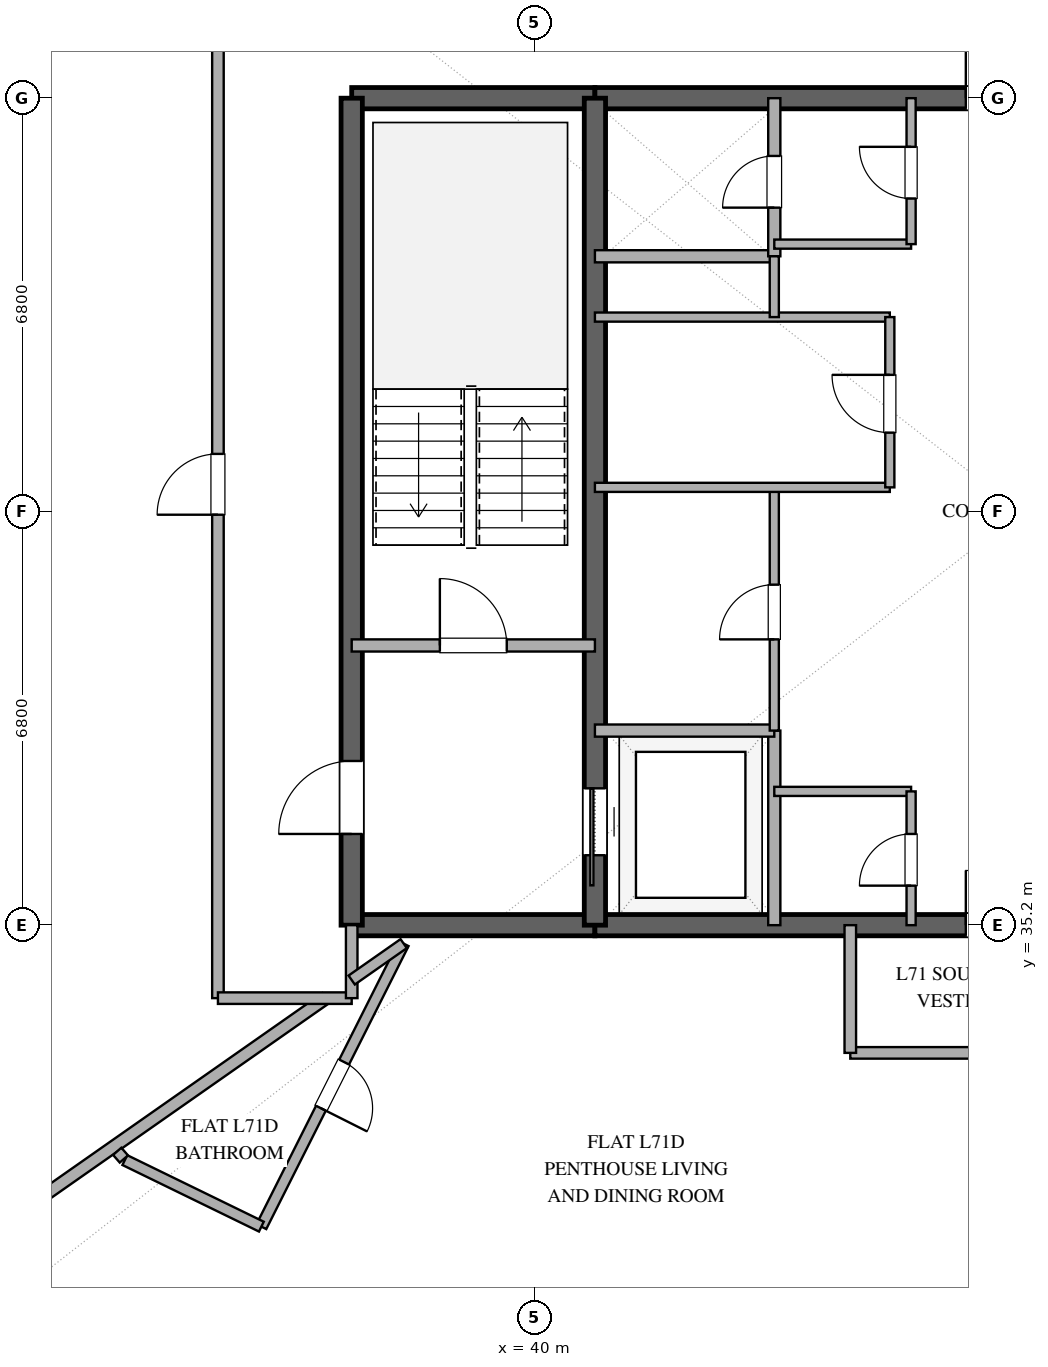
"""IFC4 building model, lengths in metres.
Left out: names, types, materials, properties, quantities, classifications, styles, units other than length and angle.
Written with IfcOpenShell. Run it as: python <this file> out.ifc"""

import sys

from ifc_helpers import new_model, si_unit, direction, frame, frame_2d, origin, place, context, subcontext, project, spatial, rectangle, extrude, element, fill, save


model = new_model("IFC4")
c1 = context("Model", 3, precision=1e-05, world=origin(), true_north=direction((0.0, 1.0)))
c2 = subcontext(c1, "Body", "Model", "MODEL_VIEW")
j1 = project(units=[si_unit("LENGTHUNIT", "METRE"), si_unit("PLANEANGLEUNIT", "RADIAN")], contexts=[c1])
p1 = place(None, origin())
s1 = spatial("IfcSite", under=j1, at=p1, CompositionType="ELEMENT")
p2 = place(p1, origin())
s2 = spatial("IfcBuilding", under=s1, at=p2, CompositionType="ELEMENT")
p3 = place(p2, frame((0.0, 0.0, 276.6)))
s3 = spatial("IfcBuildingStorey", under=s2, at=p3, CompositionType="ELEMENT", Elevation=276.6)
p4 = place(p3, frame((37.0, 35.2, 0.0), z_axis=(0.0, 0.0, 1.0), x_axis=(1.0, 0.0, 0.0)))
e1 = element("IfcWall", 1, at=p4, inside=s3, PredefinedType="SHEAR", context=c2, shape_type="SweptSolid", body=[
    extrude(rectangle(XDim=4.0, YDim=0.35, at=frame_2d((2.0, 0.0))), origin(), (0.0, 0.0, 1.0), 3.37),
])
p5 = place(p3, frame((41.0, 35.2, 0.0), z_axis=(0.0, 0.0, 1.0), x_axis=(1.0, 0.0, 0.0)))
e2 = element("IfcWall", 2, at=p5, inside=s3, PredefinedType="SHEAR", context=c2, shape_type="SweptSolid", body=[
    extrude(rectangle(XDim=14.0, YDim=0.35, at=frame_2d((7.0, 0.0))), origin(), (0.0, 0.0, 1.0), 3.37),
])
p6 = place(p5, frame((6.1, 0.0, 0.0)))
e3 = element("IfcOpeningElement", 3, at=p6, cuts=e2, PredefinedType="OPENING", context=c2, shape_type="SweptSolid", body=[
    extrude(rectangle(XDim=1.8, YDim=2.25, at=frame_2d((0.9, 1.125))), frame((0.0, 0.185, 0.0), z_axis=(0.0, -1.0, 0.0), x_axis=(1.0, 0.0, 0.0)), (0.0, 0.0, 1.0), 0.37),
])
p7 = place(p3, frame((37.0, 48.8, 0.0), z_axis=(0.0, 0.0, 1.0), x_axis=(1.0, 0.0, 0.0)))
e4 = element("IfcWall", 4, at=p7, inside=s3, PredefinedType="SHEAR", context=c2, shape_type="SweptSolid", body=[
    extrude(rectangle(XDim=4.0, YDim=0.35, at=frame_2d((2.0, 0.0))), origin(), (0.0, 0.0, 1.0), 3.37),
])
p8 = place(p3, frame((41.0, 48.8, 0.0), z_axis=(0.0, 0.0, 1.0), x_axis=(1.0, 0.0, 0.0)))
e5 = element("IfcWall", 5, at=p8, inside=s3, PredefinedType="SHEAR", context=c2, shape_type="SweptSolid", body=[
    extrude(rectangle(XDim=14.0, YDim=0.35, at=frame_2d((7.0, 0.0))), origin(), (0.0, 0.0, 1.0), 3.37),
])
p9 = place(p8, frame((6.1, 0.0, 0.0)))
e6 = element("IfcOpeningElement", 6, at=p9, cuts=e5, PredefinedType="OPENING", context=c2, shape_type="SweptSolid", body=[
    extrude(rectangle(XDim=1.8, YDim=2.25, at=frame_2d((0.9, 1.125))), frame((0.0, 0.185, 0.0), z_axis=(0.0, -1.0, 0.0), x_axis=(1.0, 0.0, 0.0)), (0.0, 0.0, 1.0), 0.37),
])
p10 = place(p3, frame((37.0, 35.2, 0.0), z_axis=(0.0, 0.0, 1.0), x_axis=(0.0, 1.0, 0.0)))
e7 = element("IfcWall", 7, at=p10, inside=s3, PredefinedType="SHEAR", context=c2, shape_type="SweptSolid", body=[
    extrude(rectangle(XDim=13.6, YDim=0.35, at=frame_2d((6.8, 0.0))), origin(), (0.0, 0.0, 1.0), 3.37),
])
p11 = place(p10, frame((1.5, 0.0, 0.0)))
e8 = element("IfcOpeningElement", 8, at=p11, cuts=e7, PredefinedType="OPENING", context=c2, shape_type="SweptSolid", body=[
    extrude(rectangle(XDim=1.2, YDim=2.15, at=frame_2d((0.6, 1.075))), frame((0.0, 0.185, 0.0), z_axis=(0.0, -1.0, 0.0), x_axis=(1.0, 0.0, 0.0)), (0.0, 0.0, 1.0), 0.37),
])
p12 = place(p3, frame((41.0, 35.2, 0.0), z_axis=(0.0, 0.0, 1.0), x_axis=(0.0, 1.0, 0.0)))
e9 = element("IfcWall", 9, at=p12, inside=s3, PredefinedType="SHEAR", context=c2, shape_type="SweptSolid", body=[
    extrude(rectangle(XDim=13.6, YDim=0.35, at=frame_2d((6.8, 0.0))), origin(), (0.0, 0.0, 1.0), 3.37),
])
p13 = place(p12, frame((1.15, 0.0, 0.0)))
e10 = element("IfcOpeningElement", 10, at=p13, cuts=e9, PredefinedType="OPENING", context=c2, shape_type="SweptSolid", body=[
    extrude(rectangle(XDim=1.1, YDim=2.2, at=frame_2d((0.55, 1.1))), frame((0.0, 0.185, 0.0), z_axis=(0.0, -1.0, 0.0), x_axis=(1.0, 0.0, 0.0)), (0.0, 0.0, 1.0), 0.37),
])
p14 = place(p3, frame((37.0, 39.8, 0.0), z_axis=(0.0, 0.0, 1.0), x_axis=(1.0, 0.0, 0.0)))
e11 = element("IfcWall", 11, at=p14, inside=s3, PredefinedType="SOLIDWALL", context=c2, shape_type="SweptSolid", body=[
    extrude(rectangle(XDim=4.0, YDim=0.2, at=frame_2d((2.0, 0.0))), origin(), (0.0, 0.0, 1.0), 2.73),
])
p15 = place(p14, frame((1.45, 0.0, 0.0)))
e12 = element("IfcOpeningElement", 12, at=p15, cuts=e11, PredefinedType="OPENING", context=c2, shape_type="SweptSolid", body=[
    extrude(rectangle(XDim=1.1, YDim=2.15, at=frame_2d((0.55, 1.075))), frame((0.0, 0.11, 0.0), z_axis=(0.0, -1.0, 0.0), x_axis=(1.0, 0.0, 0.0)), (0.0, 0.0, 1.0), 0.22),
])
p16 = place(p3, frame((43.95, 35.2, 0.0), z_axis=(0.0, 0.0, 1.0), x_axis=(0.0, 1.0, 0.0)))
e13 = element("IfcWall", 13, at=p16, inside=s3, PredefinedType="SOLIDWALL", context=c2, shape_type="SweptSolid", body=[
    extrude(rectangle(XDim=3.2, YDim=0.2, at=frame_2d((1.6, 0.0))), origin(), (0.0, 0.0, 1.0), 2.73),
])
for number, where, z_axis, x_axis in (
    (14, (41.0, 38.4, 0.0), (0.0, 0.0, 1.0), (1.0, 0.0, 0.0)),
    (15, (41.0, 46.2, 0.0), (0.0, 0.0, 1.0), (1.0, 0.0, 0.0)),
):
    element("IfcWall", number, at=place(p3, frame(where, z_axis=z_axis, x_axis=x_axis)), inside=s3, PredefinedType="SOLIDWALL", context=c2, shape_type="SweptSolid", body=[
        extrude(rectangle(XDim=2.95, YDim=0.2, at=frame_2d((1.475, 0.0))), origin(), (0.0, 0.0, 1.0), 2.73),
    ])
p17 = place(p3, frame((43.95, 46.2, 0.0), z_axis=(0.0, 0.0, 1.0), x_axis=(0.0, 1.0, 0.0)))
e16 = element("IfcWall", 16, at=p17, inside=s3, PredefinedType="SOLIDWALL", context=c2, shape_type="SweptSolid", body=[
    extrude(rectangle(XDim=2.6, YDim=0.2, at=frame_2d((1.3, 0.0))), origin(), (0.0, 0.0, 1.0), 2.73),
])
p18 = place(p17, frame((0.8, 0.0, 0.0)))
e17 = element("IfcOpeningElement", 17, at=p18, cuts=e16, PredefinedType="OPENING", context=c2, shape_type="SweptSolid", body=[
    extrude(rectangle(XDim=0.85, YDim=2.15, at=frame_2d((0.425, 1.075))), frame((0.0, 0.11, 0.0), z_axis=(0.0, -1.0, 0.0), x_axis=(1.0, 0.0, 0.0)), (0.0, 0.0, 1.0), 0.22),
])
p19 = place(p3, frame((43.95, 38.4, 0.0), z_axis=(0.0, 0.0, 1.0), x_axis=(0.0, 1.0, 0.0)))
e18 = element("IfcWall", 18, at=p19, inside=s3, PredefinedType="PARTITIONING", context=c2, shape_type="SweptSolid", body=[
    extrude(rectangle(XDim=4.0, YDim=0.15, at=frame_2d((2.0, 0.0))), origin(), (0.0, 0.0, 1.0), 2.73),
])
p20 = place(p19, frame((1.5, 0.0, 0.0)))
e19 = element("IfcOpeningElement", 19, at=p20, cuts=e18, PredefinedType="OPENING", context=c2, shape_type="SweptSolid", body=[
    extrude(rectangle(XDim=0.9, YDim=2.15, at=frame_2d((0.45, 1.075))), frame((0.0, 0.085, 0.0), z_axis=(0.0, -1.0, 0.0), x_axis=(1.0, 0.0, 0.0)), (0.0, 0.0, 1.0), 0.17),
])
for number, where, z_axis, x_axis in (
    (20, (41.0, 42.4, 0.0), (0.0, 0.0, 1.0), (1.0, 0.0, 0.0)),
    (21, (41.0, 45.2, 0.0), (0.0, 0.0, 1.0), (1.0, 0.0, 0.0)),
):
    element("IfcWall", number, at=place(p3, frame(where, z_axis=z_axis, x_axis=x_axis)), inside=s3, PredefinedType="PARTITIONING", context=c2, shape_type="SweptSolid", body=[
        extrude(rectangle(XDim=4.85, YDim=0.15, at=frame_2d((2.425, 0.0))), origin(), (0.0, 0.0, 1.0), 2.73),
    ])
p21 = place(p3, frame((43.95, 45.2, 0.0), z_axis=(0.0, 0.0, 1.0), x_axis=(0.0, 1.0, 0.0)))
e22 = element("IfcWall", 22, at=p21, inside=s3, PredefinedType="PARTITIONING", context=c2, shape_type="SweptSolid", body=[
    extrude(rectangle(XDim=1.0, YDim=0.15, at=frame_2d((0.5, 0.0))), origin(), (0.0, 0.0, 1.0), 2.73),
])
p22 = place(p3, frame((45.85, 42.4, 0.0), z_axis=(0.0, 0.0, 1.0), x_axis=(0.0, 1.0, 0.0)))
e23 = element("IfcWall", 23, at=p22, inside=s3, PredefinedType="PARTITIONING", context=c2, shape_type="SweptSolid", body=[
    extrude(rectangle(XDim=2.8, YDim=0.15, at=frame_2d((1.4, 0.0))), origin(), (0.0, 0.0, 1.0), 2.73),
])
p23 = place(p22, frame((0.9, 0.0, 0.0)))
e24 = element("IfcOpeningElement", 24, at=p23, cuts=e23, PredefinedType="OPENING", context=c2, shape_type="SweptSolid", body=[
    extrude(rectangle(XDim=0.95, YDim=2.15, at=frame_2d((0.475, 1.075))), frame((0.0, 0.085, 0.0), z_axis=(0.0, -1.0, 0.0), x_axis=(1.0, 0.0, 0.0)), (0.0, 0.0, 1.0), 0.17),
])
p24 = place(p3, frame((43.95, 37.4, 0.0), z_axis=(0.0, 0.0, 1.0), x_axis=(1.0, 0.0, 0.0)))
e25 = element("IfcWall", 25, at=p24, inside=s3, PredefinedType="PARTITIONING", context=c2, shape_type="SweptSolid", body=[
    extrude(rectangle(XDim=2.25, YDim=0.15, at=frame_2d((1.125, 0.0))), origin(), (0.0, 0.0, 1.0), 2.73),
])
p25 = place(p3, frame((46.2, 35.2, 0.0), z_axis=(0.0, 0.0, 1.0), x_axis=(0.0, 1.0, 0.0)))
e26 = element("IfcWall", 26, at=p25, inside=s3, PredefinedType="PARTITIONING", context=c2, shape_type="SweptSolid", body=[
    extrude(rectangle(XDim=2.2, YDim=0.15, at=frame_2d((1.1, 0.0))), origin(), (0.0, 0.0, 1.0), 2.73),
])
p26 = place(p25, frame((0.65, 0.0, 0.0)))
e27 = element("IfcOpeningElement", 27, at=p26, cuts=e26, PredefinedType="OPENING", context=c2, shape_type="SweptSolid", body=[
    extrude(rectangle(XDim=0.85, YDim=2.15, at=frame_2d((0.425, 1.075))), frame((0.0, 0.085, 0.0), z_axis=(0.0, -1.0, 0.0), x_axis=(1.0, 0.0, 0.0)), (0.0, 0.0, 1.0), 0.17),
])
p27 = place(p3, frame((43.95, 46.4, 0.0), z_axis=(0.0, 0.0, 1.0), x_axis=(1.0, 0.0, 0.0)))
e28 = element("IfcWall", 28, at=p27, inside=s3, PredefinedType="PARTITIONING", context=c2, shape_type="SweptSolid", body=[
    extrude(rectangle(XDim=2.25, YDim=0.15, at=frame_2d((1.125, 0.0))), origin(), (0.0, 0.0, 1.0), 2.73),
])
p28 = place(p3, frame((46.2, 46.4, 0.0), z_axis=(0.0, 0.0, 1.0), x_axis=(0.0, 1.0, 0.0)))
e29 = element("IfcWall", 29, at=p28, inside=s3, PredefinedType="PARTITIONING", context=c2, shape_type="SweptSolid", body=[
    extrude(rectangle(XDim=2.4, YDim=0.15, at=frame_2d((1.2, 0.0))), origin(), (0.0, 0.0, 1.0), 2.73),
])
p29 = place(p28, frame((0.75, 0.0, 0.0)))
e30 = element("IfcOpeningElement", 30, at=p29, cuts=e29, PredefinedType="OPENING", context=c2, shape_type="SweptSolid", body=[
    extrude(rectangle(XDim=0.85, YDim=2.15, at=frame_2d((0.425, 1.075))), frame((0.0, 0.085, 0.0), z_axis=(0.0, -1.0, 0.0), x_axis=(1.0, 0.0, 0.0)), (0.0, 0.0, 1.0), 0.17),
])
p30 = place(p3, frame((34.8, 34.0, 0.0), z_axis=(0.0, 0.0, 1.0), x_axis=(0.0, 1.0, 0.0)))
e31 = element("IfcWall", 31, at=p30, inside=s3, PredefinedType="PARTITIONING", context=c2, shape_type="SweptSolid", body=[
    extrude(rectangle(XDim=16.9, YDim=0.19, at=frame_2d((8.45, 0.0))), origin(), (0.0, 0.0, 1.0), 2.73),
])
p31 = place(p30, frame((7.95, 0.0, 0.0)))
e32 = element("IfcOpeningElement", 32, at=p31, cuts=e31, PredefinedType="OPENING", context=c2, shape_type="SweptSolid", body=[
    extrude(rectangle(XDim=1.0, YDim=2.2, at=frame_2d((0.5, 1.1))), frame((0.0, 0.105, 0.0), z_axis=(0.0, -1.0, 0.0), x_axis=(1.0, 0.0, 0.0)), (0.0, 0.0, 1.0), 0.21),
])
p32 = place(p3, frame((50.8, 33.1, 0.0), z_axis=(0.0, 0.0, 1.0), x_axis=(-1.0, 0.0, 0.0)))
e33 = element("IfcWall", 33, at=p32, inside=s3, PredefinedType="PARTITIONING", context=c2, shape_type="SweptSolid", body=[
    extrude(rectangle(XDim=5.6, YDim=0.19, at=frame_2d((2.8, 0.0))), origin(), (0.0, 0.0, 1.0), 2.73),
])
p33 = place(p32, frame((2.3, 0.0, 0.0)))
e34 = element("IfcOpeningElement", 34, at=p33, cuts=e33, PredefinedType="OPENING", context=c2, shape_type="SweptSolid", body=[
    extrude(rectangle(XDim=1.0, YDim=2.2, at=frame_2d((0.5, 1.1))), frame((0.0, 0.105, 0.0), z_axis=(0.0, -1.0, 0.0), x_axis=(1.0, 0.0, 0.0)), (0.0, 0.0, 1.0), 0.21),
])
p34 = place(p3, frame((37.855, 34.896, 0.0), z_axis=(0.0, 0.0, 1.0), x_axis=(-0.449274589412, -0.893393722447, 0.0)))
e35 = element("IfcWall", 35, at=p34, inside=s3, PredefinedType="PLUMBINGWALL", context=c2, shape_type="SweptSolid", body=[
    extrude(rectangle(XDim=5.209, YDim=0.18, at=frame_2d((2.604, 0.0))), origin(), (0.0, 0.0, 1.0), 2.73),
])
p35 = place(p34, frame((2.18, 0.0, 0.0)))
e36 = element("IfcOpeningElement", 36, at=p35, cuts=e35, PredefinedType="OPENING", context=c2, shape_type="SweptSolid", body=[
    extrude(rectangle(XDim=0.85, YDim=2.1, at=frame_2d((0.425, 1.05))), frame((0.0, 0.1, 0.0), z_axis=(0.0, -1.0, 0.0), x_axis=(1.0, 0.0, 0.0)), (0.0, 0.0, 1.0), 0.2),
])
p36 = place(p3, frame((36.575, 34.0, 0.0), z_axis=(0.0, 0.0, 1.0), x_axis=(-0.819138444565, -0.57359585828, 0.0)))
e37 = element("IfcWall", 37, at=p36, inside=s3, PredefinedType="PARTITIONING", context=c2, shape_type="SweptSolid", body=[
    extrude(rectangle(XDim=9.326, YDim=0.2, at=frame_2d((4.663, 0.0))), origin(), (0.0, 0.0, 1.0), 2.73),
])
p37 = place(p3, frame((35.514, 30.242, 0.0), z_axis=(0.0, 0.0, 1.0), x_axis=(-0.898915857852, 0.438121307975, 0.0)))
e38 = element("IfcWall", 38, at=p37, inside=s3, PredefinedType="PLUMBINGWALL", context=c2, shape_type="SweptSolid", body=[
    extrude(rectangle(XDim=2.498, YDim=0.18, at=frame_2d((1.249, 0.0))), origin(), (0.0, 0.0, 1.0), 2.73),
])
p38 = place(p3, frame((45.2, 33.1, 0.0), z_axis=(0.0, 0.0, 1.0), x_axis=(0.0, 1.0, 0.0)))
e39 = element("IfcWall", 39, at=p38, inside=s3, PredefinedType="PARTITIONING", context=c2, shape_type="SweptSolid", body=[
    extrude(rectangle(XDim=2.1, YDim=0.19, at=frame_2d((1.05, 0.0))), origin(), (0.0, 0.0, 1.0), 2.73),
])
p39 = place(p3, frame((37.0, 34.0, 0.0), z_axis=(0.0, 0.0, 1.0), x_axis=(-1.0, 0.0, 0.0)))
e40 = element("IfcWall", 40, at=p39, inside=s3, PredefinedType="PARTITIONING", context=c2, shape_type="SweptSolid", body=[
    extrude(rectangle(XDim=2.2, YDim=0.19, at=frame_2d((1.1, 0.0))), origin(), (0.0, 0.0, 1.0), 2.73),
])
p40 = place(p3, frame((37.0, 35.2, 0.0), z_axis=(0.0, 0.0, 1.0), x_axis=(0.0, -1.0, 0.0)))
e41 = element("IfcWall", 41, at=p40, inside=s3, PredefinedType="PARTITIONING", context=c2, shape_type="SweptSolid", body=[
    extrude(rectangle(XDim=1.2, YDim=0.19, at=frame_2d((0.6, 0.0))), origin(), (0.0, 0.0, 1.0), 2.73),
])
p41 = place(p3, frame((37.0, 34.298, 0.0), z_axis=(0.0, 0.0, 1.0), x_axis=(0.81908900763, 0.573666451502, 0.0)))
e42 = element("IfcWall", 42, at=p41, inside=s3, PredefinedType="PLUMBINGWALL", context=c2, shape_type="SweptSolid", body=[
    extrude(rectangle(XDim=1.043, YDim=0.18, at=frame_2d((0.522, 0.0))), origin(), (0.0, 0.0, 1.0), 2.73),
])
p42 = place(p3, frame((33.253, 31.355, 0.0), z_axis=(0.0, 0.0, 1.0), x_axis=(-0.656323784366, 0.754479350331, 0.0)))
e43 = element("IfcWall", 43, at=p42, inside=s3, PredefinedType="PLUMBINGWALL", context=c2, shape_type="SweptSolid", body=[
    extrude(rectangle(XDim=0.167, YDim=0.18, at=frame_2d((0.083, 0.0))), origin(), (0.0, 0.0, 1.0), 2.73),
])
p43 = place(p13, origin())
e44 = element("IfcDoor", 44, at=p43, inside=s3, OperationType="SLIDING_TO_LEFT", PredefinedType="DOOR", context=c2, shape_type="SweptSolid", body=[
    extrude(rectangle(XDim=1.1, YDim=2.2, at=frame_2d((0.55, 1.1))), frame((0.0, 0.025, 0.0), z_axis=(0.0, -1.0, 0.0), x_axis=(1.0, 0.0, 0.0)), (0.0, 0.0, 1.0), 0.05),
])
fill(e10, e44)
p44 = place(p11, origin())
e45 = element("IfcDoor", 45, at=p44, inside=s3, OperationType="SINGLE_SWING_LEFT", PredefinedType="DOOR", context=c2, shape_type="SweptSolid", body=[
    extrude(rectangle(XDim=1.2, YDim=2.15, at=frame_2d((0.6, 1.075))), frame((0.0, 0.025, 0.0), z_axis=(0.0, -1.0, 0.0), x_axis=(1.0, 0.0, 0.0)), (0.0, 0.0, 1.0), 0.05),
])
fill(e8, e45)
p45 = place(p6, origin())
e46 = element("IfcDoor", 46, at=p45, inside=s3, OperationType="DOUBLE_DOOR_SINGLE_SWING", PredefinedType="DOOR", context=c2, shape_type="SweptSolid", body=[
    extrude(rectangle(XDim=1.8, YDim=2.25, at=frame_2d((0.9, 1.125))), frame((0.0, 0.025, 0.0), z_axis=(0.0, -1.0, 0.0), x_axis=(1.0, 0.0, 0.0)), (0.0, 0.0, 1.0), 0.05),
])
fill(e3, e46)
p46 = place(p9, origin())
e47 = element("IfcDoor", 47, at=p46, inside=s3, OperationType="DOUBLE_DOOR_SINGLE_SWING", PredefinedType="DOOR", context=c2, shape_type="SweptSolid", body=[
    extrude(rectangle(XDim=1.8, YDim=2.25, at=frame_2d((0.9, 1.125))), frame((0.0, 0.025, 0.0), z_axis=(0.0, -1.0, 0.0), x_axis=(1.0, 0.0, 0.0)), (0.0, 0.0, 1.0), 0.05),
])
fill(e6, e47)
p47 = place(p15, origin())
e48 = element("IfcDoor", 48, at=p47, inside=s3, OperationType="SINGLE_SWING_LEFT", PredefinedType="DOOR", context=c2, shape_type="SweptSolid", body=[
    extrude(rectangle(XDim=1.1, YDim=2.15, at=frame_2d((0.55, 1.075))), frame((0.0, 0.025, 0.0), z_axis=(0.0, -1.0, 0.0), x_axis=(1.0, 0.0, 0.0)), (0.0, 0.0, 1.0), 0.05),
])
fill(e12, e48)
p48 = place(p18, origin())
e49 = element("IfcDoor", 49, at=p48, inside=s3, OperationType="SINGLE_SWING_LEFT", PredefinedType="DOOR", context=c2, shape_type="SweptSolid", body=[
    extrude(rectangle(XDim=0.85, YDim=2.15, at=frame_2d((0.425, 1.075))), frame((0.0, 0.025, 0.0), z_axis=(0.0, -1.0, 0.0), x_axis=(1.0, 0.0, 0.0)), (0.0, 0.0, 1.0), 0.05),
])
fill(e17, e49)
p49 = place(p20, origin())
e50 = element("IfcDoor", 50, at=p49, inside=s3, OperationType="SINGLE_SWING_LEFT", PredefinedType="DOOR", context=c2, shape_type="SweptSolid", body=[
    extrude(rectangle(XDim=0.9, YDim=2.15, at=frame_2d((0.45, 1.075))), frame((0.0, 0.025, 0.0), z_axis=(0.0, -1.0, 0.0), x_axis=(1.0, 0.0, 0.0)), (0.0, 0.0, 1.0), 0.05),
])
fill(e19, e50)
p50 = place(p23, origin())
e51 = element("IfcDoor", 51, at=p50, inside=s3, OperationType="SINGLE_SWING_RIGHT", PredefinedType="DOOR", context=c2, shape_type="SweptSolid", body=[
    extrude(rectangle(XDim=0.95, YDim=2.15, at=frame_2d((0.475, 1.075))), frame((0.0, 0.025, 0.0), z_axis=(0.0, -1.0, 0.0), x_axis=(1.0, 0.0, 0.0)), (0.0, 0.0, 1.0), 0.05),
])
fill(e24, e51)
p51 = place(p26, origin())
e52 = element("IfcDoor", 52, at=p51, inside=s3, OperationType="SINGLE_SWING_LEFT", PredefinedType="DOOR", context=c2, shape_type="SweptSolid", body=[
    extrude(rectangle(XDim=0.85, YDim=2.15, at=frame_2d((0.425, 1.075))), frame((0.0, 0.025, 0.0), z_axis=(0.0, -1.0, 0.0), x_axis=(1.0, 0.0, 0.0)), (0.0, 0.0, 1.0), 0.05),
])
fill(e27, e52)
p52 = place(p29, origin())
e53 = element("IfcDoor", 53, at=p52, inside=s3, OperationType="SINGLE_SWING_RIGHT", PredefinedType="DOOR", context=c2, shape_type="SweptSolid", body=[
    extrude(rectangle(XDim=0.85, YDim=2.15, at=frame_2d((0.425, 1.075))), frame((0.0, 0.025, 0.0), z_axis=(0.0, -1.0, 0.0), x_axis=(1.0, 0.0, 0.0)), (0.0, 0.0, 1.0), 0.05),
])
fill(e30, e53)
p53 = place(p31, origin())
e54 = element("IfcDoor", 54, at=p53, inside=s3, OperationType="SINGLE_SWING_LEFT", PredefinedType="DOOR", context=c2, shape_type="SweptSolid", body=[
    extrude(rectangle(XDim=1.0, YDim=2.2, at=frame_2d((0.5, 1.1))), frame((0.0, 0.025, 0.0), z_axis=(0.0, -1.0, 0.0), x_axis=(1.0, 0.0, 0.0)), (0.0, 0.0, 1.0), 0.05),
])
fill(e32, e54)
p54 = place(p35, origin())
e55 = element("IfcDoor", 55, at=p54, inside=s3, OperationType="SINGLE_SWING_RIGHT", PredefinedType="DOOR", context=c2, shape_type="SweptSolid", body=[
    extrude(rectangle(XDim=0.85, YDim=2.1, at=frame_2d((0.425, 1.05))), frame((0.0, 0.025, 0.0), z_axis=(0.0, -1.0, 0.0), x_axis=(1.0, 0.0, 0.0)), (0.0, 0.0, 1.0), 0.05),
])
fill(e36, e55)
save(model, sys.argv[1])
